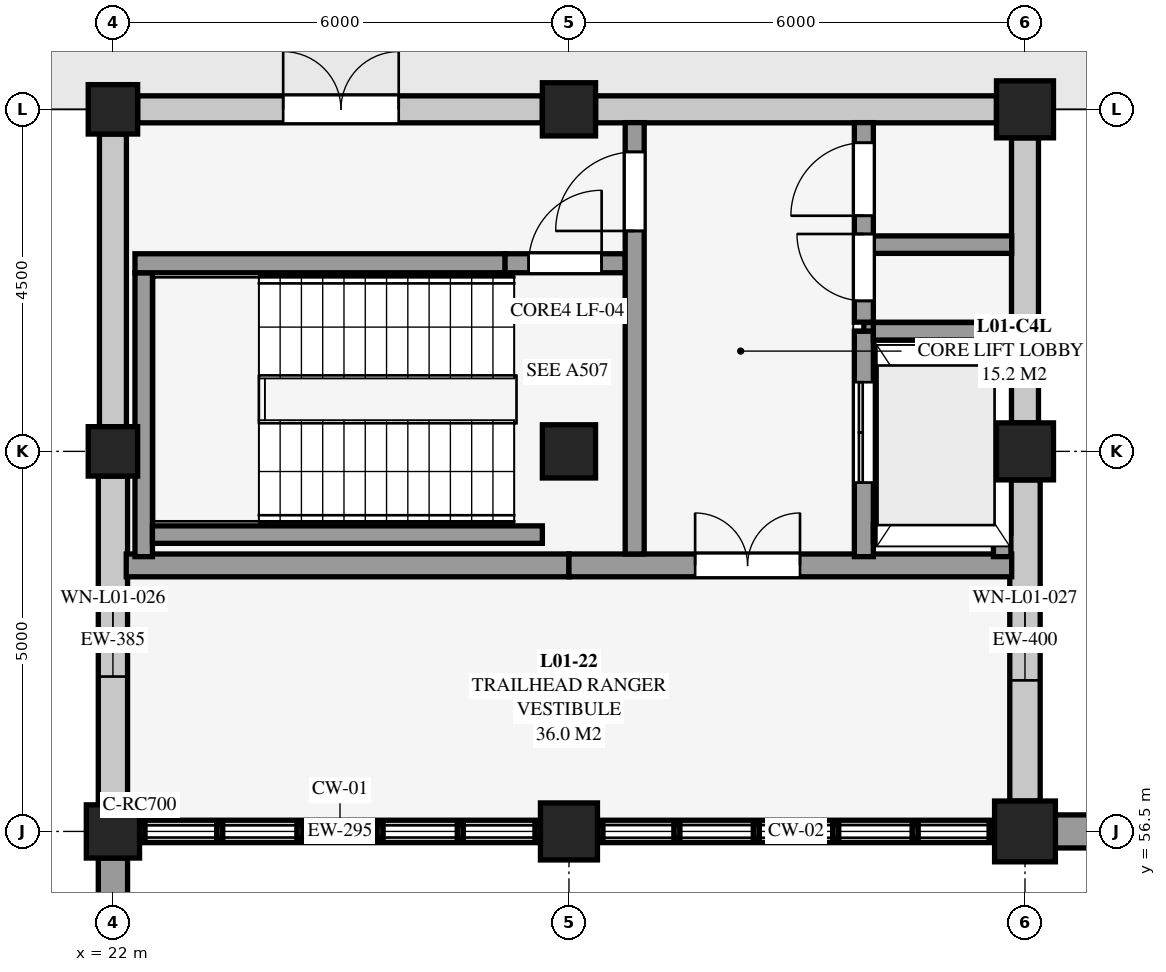
"""IFC4 building model, lengths in metres.
Left out: names, types, materials, properties, quantities, classifications, styles, units other than length and angle.
Written with IfcOpenShell. Run it as: python <this file> out.ifc"""

import sys

from ifc_helpers import new_model, si_unit, direction, frame, frame_2d, origin, origin_2d, place, context, subcontext, project, spatial, rectangle, extrude, element, fill, save


model = new_model("IFC4")
c1 = context("Model", 3, precision=1e-05, world=origin(), true_north=direction((0.0, 1.0)))
c2 = subcontext(c1, "Body", "Model", "MODEL_VIEW")
j1 = project(units=[si_unit("LENGTHUNIT", "METRE"), si_unit("PLANEANGLEUNIT", "RADIAN")], contexts=[c1])
p1 = place(None, origin())
s1 = spatial("IfcSite", under=j1, at=p1, CompositionType="ELEMENT")
p2 = place(p1, origin())
s2 = spatial("IfcBuilding", under=s1, at=p2, CompositionType="ELEMENT")
p3 = place(p2, origin())
s3 = spatial("IfcBuildingStorey", under=s2, at=p3, CompositionType="ELEMENT", Elevation=0.0)
p4 = place(p3, frame((22.0, 56.5, 0.0), z_axis=(0.0, 0.0, 1.0), x_axis=(1.0, 0.0, 0.0)))
e1 = element("IfcColumn", 1, at=p4, inside=s3, PredefinedType="COLUMN", context=c2, shape_type="SweptSolid", body=[
    extrude(rectangle(XDim=0.7, YDim=0.7, at=origin_2d()), origin(), (0.0, 0.0, 1.0), 4.5),
])
for number, where, z_axis, x_axis in (
    (2, (22.0, 61.5, 0.0), (0.0, 0.0, 1.0), (1.0, 0.0, 0.0)),
    (3, (22.0, 66.0, 0.0), (0.0, 0.0, 1.0), (1.0, 0.0, 0.0)),
):
    element("IfcColumn", number, at=place(p3, frame(where, z_axis=z_axis, x_axis=x_axis)), inside=s3, PredefinedType="COLUMN", context=c2, shape_type="SweptSolid", body=[
        extrude(rectangle(XDim=0.65, YDim=0.65, at=origin_2d()), origin(), (0.0, 0.0, 1.0), 4.5),
    ])
p5 = place(p3, frame((28.0, 56.5, 0.0), z_axis=(0.0, 0.0, 1.0), x_axis=(1.0, 0.0, 0.0)))
e4 = element("IfcColumn", 4, at=p5, inside=s3, PredefinedType="COLUMN", context=c2, shape_type="SweptSolid", body=[
    extrude(rectangle(XDim=0.75, YDim=0.75, at=origin_2d()), origin(), (0.0, 0.0, 1.0), 4.5),
])
for number, where, z_axis, x_axis in (
    (5, (28.0, 61.5, 0.0), (0.0, 0.0, 1.0), (1.0, 0.0, 0.0)),
    (6, (28.0, 66.0, 0.0), (0.0, 0.0, 1.0), (1.0, 0.0, 0.0)),
):
    element("IfcColumn", number, at=place(p3, frame(where, z_axis=z_axis, x_axis=x_axis)), inside=s3, PredefinedType="COLUMN", context=c2, shape_type="SweptSolid", body=[
        extrude(rectangle(XDim=0.7, YDim=0.7, at=origin_2d()), origin(), (0.0, 0.0, 1.0), 4.5),
    ])
p6 = place(p3, frame((34.0, 56.5, 0.0), z_axis=(0.0, 0.0, 1.0), x_axis=(1.0, 0.0, 0.0)))
e7 = element("IfcColumn", 7, at=p6, inside=s3, PredefinedType="COLUMN", context=c2, shape_type="SweptSolid", body=[
    extrude(rectangle(XDim=0.8, YDim=0.8, at=origin_2d()), origin(), (0.0, 0.0, 1.0), 4.5),
])
for number, where, z_axis, x_axis in (
    (8, (34.0, 61.5, 0.0), (0.0, 0.0, 1.0), (1.0, 0.0, 0.0)),
    (9, (34.0, 66.0, 0.0), (0.0, 0.0, 1.0), (1.0, 0.0, 0.0)),
):
    element("IfcColumn", number, at=place(p3, frame(where, z_axis=z_axis, x_axis=x_axis)), inside=s3, PredefinedType="COLUMN", context=c2, shape_type="SweptSolid", body=[
        extrude(rectangle(XDim=0.75, YDim=0.75, at=origin_2d()), origin(), (0.0, 0.0, 1.0), 4.5),
    ])
p7 = place(p3, frame((34.4, 56.5, 0.0), z_axis=(0.0, 0.0, 1.0), x_axis=(1.0, 0.0, 0.0)))
e10 = element("IfcWall", 10, at=p7, inside=s3, PredefinedType="USERDEFINED", context=c2, shape_type="SweptSolid", body=[
    extrude(rectangle(XDim=5.25, YDim=0.435, at=frame_2d((2.625, 0.0))), origin(), (0.0, 0.0, 1.0), 4.5),
])
p8 = place(p3, frame((22.0, 51.375, 0.0), z_axis=(0.0, 0.0, 1.0), x_axis=(0.0, 1.0, 0.0)))
e11 = element("IfcWall", 11, at=p8, inside=s3, PredefinedType="USERDEFINED", context=c2, shape_type="SweptSolid", body=[
    extrude(rectangle(XDim=4.775, YDim=0.385, at=frame_2d((2.387, 0.0))), origin(), (0.0, 0.0, 1.0), 4.5),
])
p9 = place(p3, frame((27.625, 56.5, 0.0), z_axis=(0.0, 0.0, 1.0), x_axis=(-1.0, 0.0, 0.0)))
e12 = element("IfcWall", 12, at=p9, inside=s3, PredefinedType="SOLIDWALL", context=c2, shape_type="SweptSolid", body=[
    extrude(rectangle(XDim=5.275, YDim=0.295, at=frame_2d((2.637, 0.0))), origin(), (0.0, 0.0, 1.0), 0.16),
])
p10 = place(p3, frame((22.325, 66.0, 0.0), z_axis=(0.0, 0.0, 1.0), x_axis=(1.0, 0.0, 0.0)))
e13 = element("IfcWall", 13, at=p10, inside=s3, PredefinedType="SOLIDWALL", context=c2, shape_type="SweptSolid", body=[
    extrude(rectangle(XDim=5.325, YDim=0.355, at=frame_2d((2.663, 0.0))), origin(), (0.0, 0.0, 1.0), 3.881),
])
p11 = place(p10, frame((1.915, 0.0, 0.0)))
e14 = element("IfcOpeningElement", 14, at=p11, cuts=e13, PredefinedType="OPENING", context=c2, shape_type="SweptSolid", body=[
    extrude(rectangle(XDim=1.52, YDim=2.16, at=frame_2d((0.76, 1.08))), frame((0.0, 0.188, 0.0), z_axis=(0.0, -1.0, 0.0), x_axis=(1.0, 0.0, 0.0)), (0.0, 0.0, 1.0), 0.375),
])
p12 = place(p3, frame((33.6, 56.5, 0.0), z_axis=(0.0, 0.0, 1.0), x_axis=(-1.0, 0.0, 0.0)))
e15 = element("IfcWall", 15, at=p12, inside=s3, PredefinedType="SOLIDWALL", context=c2, shape_type="SweptSolid", body=[
    extrude(rectangle(XDim=5.225, YDim=0.295, at=frame_2d((2.613, 0.0))), origin(), (0.0, 0.0, 1.0), 0.21),
])
p13 = place(p3, frame((28.35, 66.0, 0.0), z_axis=(0.0, 0.0, 1.0), x_axis=(1.0, 0.0, 0.0)))
e16 = element("IfcWall", 16, at=p13, inside=s3, PredefinedType="SOLIDWALL", context=c2, shape_type="SweptSolid", body=[
    extrude(rectangle(XDim=5.275, YDim=0.355, at=frame_2d((2.637, 0.0))), origin(), (0.0, 0.0, 1.0), 3.881),
])
p14 = place(p3, frame((22.0, 56.85, 0.0), z_axis=(0.0, 0.0, 1.0), x_axis=(0.0, 1.0, 0.0)))
e17 = element("IfcWall", 17, at=p14, inside=s3, PredefinedType="SOLIDWALL", context=c2, shape_type="SweptSolid", body=[
    extrude(rectangle(XDim=4.325, YDim=0.385, at=frame_2d((2.163, 0.0))), origin(), (0.0, 0.0, 1.0), 3.843),
])
p15 = place(p14, frame((1.688, 0.0, 0.9)))
e18 = element("IfcOpeningElement", 18, at=p15, cuts=e17, PredefinedType="OPENING", context=c2, shape_type="SweptSolid", body=[
    extrude(rectangle(XDim=0.95, YDim=1.95, at=frame_2d((0.475, 0.975))), frame((0.0, 0.202, 0.0), z_axis=(0.0, -1.0, 0.0), x_axis=(1.0, 0.0, 0.0)), (0.0, 0.0, 1.0), 0.405),
])
p16 = place(p3, frame((34.0, 61.125, 0.0), z_axis=(0.0, 0.0, 1.0), x_axis=(0.0, -1.0, 0.0)))
e19 = element("IfcWall", 19, at=p16, inside=s3, PredefinedType="SOLIDWALL", context=c2, shape_type="SweptSolid", body=[
    extrude(rectangle(XDim=4.225, YDim=0.4, at=frame_2d((2.113, 0.0))), origin(), (0.0, 0.0, 1.0), 3.881),
])
p17 = place(p16, frame((1.587, 0.0, 0.85)))
e20 = element("IfcOpeningElement", 20, at=p17, cuts=e19, PredefinedType="OPENING", context=c2, shape_type="SweptSolid", body=[
    extrude(rectangle(XDim=1.05, YDim=2.05, at=frame_2d((0.525, 1.025))), frame((0.0, 0.21, 0.0), z_axis=(0.0, -1.0, 0.0), x_axis=(1.0, 0.0, 0.0)), (0.0, 0.0, 1.0), 0.42),
])
p18 = place(p3, frame((22.0, 61.825, 0.0), z_axis=(0.0, 0.0, 1.0), x_axis=(0.0, 1.0, 0.0)))
e21 = element("IfcWall", 21, at=p18, inside=s3, PredefinedType="SOLIDWALL", context=c2, shape_type="SweptSolid", body=[
    extrude(rectangle(XDim=3.85, YDim=0.355, at=frame_2d((1.925, 0.0))), origin(), (0.0, 0.0, 1.0), 3.843),
])
p19 = place(p3, frame((34.0, 65.625, 0.0), z_axis=(0.0, 0.0, 1.0), x_axis=(0.0, -1.0, 0.0)))
e22 = element("IfcWall", 22, at=p19, inside=s3, PredefinedType="SOLIDWALL", context=c2, shape_type="SweptSolid", body=[
    extrude(rectangle(XDim=3.75, YDim=0.355, at=frame_2d((1.875, 0.0))), origin(), (0.0, 0.0, 1.0), 3.881),
])
p20 = place(p3, frame((31.88, 60.42, -1.05), z_axis=(0.0, 0.0, 1.0), x_axis=(1.0, 0.0, 0.0)))
e23 = element("IfcWall", 23, at=p20, inside=s3, PredefinedType="SHEAR", context=c2, shape_type="SweptSolid", body=[
    extrude(rectangle(XDim=1.82, YDim=0.23, at=frame_2d((0.91, 0.0))), origin(), (0.0, 0.0, 1.0), 1.05),
])
p21 = place(p3, frame((33.7, 60.42, -1.05), z_axis=(0.0, 0.0, 1.0), x_axis=(0.0, 1.0, 0.0)))
e24 = element("IfcWall", 24, at=p21, inside=s3, PredefinedType="SHEAR", context=c2, shape_type="SweptSolid", body=[
    extrude(rectangle(XDim=2.66, YDim=0.23, at=frame_2d((1.33, 0.0))), origin(), (0.0, 0.0, 1.0), 1.05),
])
p22 = place(p3, frame((33.7, 63.08, -1.05), z_axis=(0.0, 0.0, 1.0), x_axis=(-1.0, 0.0, 0.0)))
e25 = element("IfcWall", 25, at=p22, inside=s3, PredefinedType="SHEAR", context=c2, shape_type="SweptSolid", body=[
    extrude(rectangle(XDim=1.82, YDim=0.23, at=frame_2d((0.91, 0.0))), origin(), (0.0, 0.0, 1.0), 1.05),
])
p23 = place(p3, frame((31.88, 63.08, -1.05), z_axis=(0.0, 0.0, 1.0), x_axis=(0.0, -1.0, 0.0)))
e26 = element("IfcWall", 26, at=p23, inside=s3, PredefinedType="SHEAR", context=c2, shape_type="SweptSolid", body=[
    extrude(rectangle(XDim=2.66, YDim=0.23, at=frame_2d((1.33, 0.0))), origin(), (0.0, 0.0, 1.0), 1.05),
])
p24 = place(p3, frame((22.175, 60.0, 0.0), z_axis=(0.0, 0.0, 1.0), x_axis=(1.0, 0.0, 0.0)))
e27 = element("IfcWall", 27, at=p24, inside=s3, PredefinedType="SHEAR", context=c2, shape_type="SweptSolid", body=[
    extrude(rectangle(XDim=5.825, YDim=0.3, at=frame_2d((2.913, 0.0))), origin(), (0.0, 0.0, 1.0), 4.288),
])
p25 = place(p3, frame((28.0, 60.0, 0.0), z_axis=(0.0, 0.0, 1.0), x_axis=(1.0, 0.0, 0.0)))
e28 = element("IfcWall", 28, at=p25, inside=s3, PredefinedType="SHEAR", context=c2, shape_type="SweptSolid", body=[
    extrude(rectangle(XDim=5.825, YDim=0.3, at=frame_2d((2.913, 0.0))), origin(), (0.0, 0.0, 1.0), 4.288),
])
p26 = place(p25, frame((1.66, 0.0, 0.0)))
e29 = element("IfcOpeningElement", 29, at=p26, cuts=e28, PredefinedType="OPENING", context=c2, shape_type="SweptSolid", body=[
    extrude(rectangle(XDim=1.38, YDim=2.16, at=frame_2d((0.69, 1.08))), frame((0.0, 0.16, 0.0), z_axis=(0.0, -1.0, 0.0), x_axis=(1.0, 0.0, 0.0)), (0.0, 0.0, 1.0), 0.32),
])
p27 = place(p3, frame((22.405, 60.115, 0.0), z_axis=(0.0, 0.0, 1.0), x_axis=(0.0, 1.0, 0.0)))
e30 = element("IfcWall", 30, at=p27, inside=s3, PredefinedType="SHEAR", context=c2, shape_type="SweptSolid", body=[
    extrude(rectangle(XDim=3.735, YDim=0.23, at=frame_2d((1.868, 0.0))), origin(), (0.0, 0.0, 1.0), 4.5),
])
p28 = place(p3, frame((22.52, 60.405, 0.0), z_axis=(0.0, 0.0, 1.0), x_axis=(1.0, 0.0, 0.0)))
e31 = element("IfcWall", 31, at=p28, inside=s3, PredefinedType="SHEAR", context=c2, shape_type="SweptSolid", body=[
    extrude(rectangle(XDim=5.13, YDim=0.23, at=frame_2d((2.565, 0.0))), origin(), (0.0, 0.0, 1.0), 4.5),
])
p29 = place(p3, frame((22.29, 63.975, 0.0), z_axis=(0.0, 0.0, 1.0), x_axis=(1.0, 0.0, 0.0)))
e32 = element("IfcWall", 32, at=p29, inside=s3, PredefinedType="SHEAR", context=c2, shape_type="SweptSolid", body=[
    extrude(rectangle(XDim=4.87, YDim=0.25, at=frame_2d((2.435, 0.0))), origin(), (0.0, 0.0, 1.0), 4.5),
])
p30 = place(p3, frame((27.16, 63.975, 0.0), z_axis=(0.0, 0.0, 1.0), x_axis=(1.0, 0.0, 0.0)))
e33 = element("IfcWall", 33, at=p30, inside=s3, PredefinedType="SHEAR", context=c2, shape_type="SweptSolid", body=[
    extrude(rectangle(XDim=1.58, YDim=0.25, at=frame_2d((0.79, 0.0))), origin(), (0.0, 0.0, 1.0), 4.288),
])
p31 = place(p30, frame((0.31, 0.0, 0.0)))
e34 = element("IfcOpeningElement", 34, at=p31, cuts=e33, PredefinedType="OPENING", context=c2, shape_type="SweptSolid", body=[
    extrude(rectangle(XDim=0.96, YDim=2.12, at=frame_2d((0.48, 1.06))), frame((0.0, 0.135, 0.0), z_axis=(0.0, -1.0, 0.0), x_axis=(1.0, 0.0, 0.0)), (0.0, 0.0, 1.0), 0.27),
])
p32 = place(p3, frame((28.865, 60.15, 0.0), z_axis=(0.0, 0.0, 1.0), x_axis=(0.0, 1.0, 0.0)))
e35 = element("IfcWall", 35, at=p32, inside=s3, PredefinedType="SHEAR", context=c2, shape_type="SweptSolid", body=[
    extrude(rectangle(XDim=5.675, YDim=0.25, at=frame_2d((2.837, 0.0))), origin(), (0.0, 0.0, 1.0), 4.288),
])
p33 = place(p32, frame((4.25, 0.0, 0.0)))
e36 = element("IfcOpeningElement", 36, at=p33, cuts=e35, PredefinedType="OPENING", context=c2, shape_type="SweptSolid", body=[
    extrude(rectangle(XDim=1.04, YDim=2.14, at=frame_2d((0.52, 1.07))), frame((0.0, 0.135, 0.0), z_axis=(0.0, -1.0, 0.0), x_axis=(1.0, 0.0, 0.0)), (0.0, 0.0, 1.0), 0.27),
])
p34 = place(p3, frame((31.88, 60.115, 0.0), z_axis=(0.0, 0.0, 1.0), x_axis=(0.0, 1.0, 0.0)))
e37 = element("IfcWall", 37, at=p34, inside=s3, PredefinedType="SHEAR", context=c2, shape_type="SweptSolid", body=[
    extrude(rectangle(XDim=2.965, YDim=0.25, at=frame_2d((1.482, 0.0))), origin(), (0.0, 0.0, 1.0), 4.5),
])
p35 = place(p34, frame((0.975, 0.0, 0.0)))
e38 = element("IfcOpeningElement", 38, at=p35, cuts=e37, PredefinedType="OPENING", context=c2, shape_type="SweptSolid", body=[
    extrude(rectangle(XDim=1.32, YDim=2.2, at=frame_2d((0.66, 1.1))), frame((0.0, 0.135, 0.0), z_axis=(0.0, -1.0, 0.0), x_axis=(1.0, 0.0, 0.0)), (0.0, 0.0, 1.0), 0.27),
])
p36 = place(p3, frame((32.005, 60.42, 0.0), z_axis=(0.0, 0.0, 1.0), x_axis=(1.0, 0.0, 0.0)))
e39 = element("IfcWall", 39, at=p36, inside=s3, PredefinedType="SHEAR", context=c2, shape_type="SweptSolid", body=[
    extrude(rectangle(XDim=1.58, YDim=0.23, at=frame_2d((0.79, 0.0))), origin(), (0.0, 0.0, 1.0), 4.5),
])
p37 = place(p3, frame((33.7, 60.115, 0.0), z_axis=(0.0, 0.0, 1.0), x_axis=(0.0, 1.0, 0.0)))
e40 = element("IfcWall", 40, at=p37, inside=s3, PredefinedType="SHEAR", context=c2, shape_type="SweptSolid", body=[
    extrude(rectangle(XDim=2.965, YDim=0.23, at=frame_2d((1.482, 0.0))), origin(), (0.0, 0.0, 1.0), 4.5),
])
p38 = place(p3, frame((32.005, 63.08, 0.0), z_axis=(0.0, 0.0, 1.0), x_axis=(1.0, 0.0, 0.0)))
e41 = element("IfcWall", 41, at=p38, inside=s3, PredefinedType="SHEAR", context=c2, shape_type="SweptSolid", body=[
    extrude(rectangle(XDim=1.58, YDim=0.23, at=frame_2d((0.79, 0.0))), origin(), (0.0, 0.0, 1.0), 4.5),
])
p39 = place(p3, frame((31.88, 63.2, 0.0), z_axis=(0.0, 0.0, 1.0), x_axis=(0.0, 1.0, 0.0)))
e42 = element("IfcWall", 42, at=p39, inside=s3, PredefinedType="SHEAR", context=c2, shape_type="SweptSolid", body=[
    extrude(rectangle(XDim=2.625, YDim=0.25, at=frame_2d((1.312, 0.0))), origin(), (0.0, 0.0, 1.0), 4.288),
])
p40 = place(p39, frame((0.28, 0.0, 0.0)))
e43 = element("IfcOpeningElement", 43, at=p40, cuts=e42, PredefinedType="OPENING", context=c2, shape_type="SweptSolid", body=[
    extrude(rectangle(XDim=0.88, YDim=2.08, at=frame_2d((0.44, 1.04))), frame((0.0, 0.135, 0.0), z_axis=(0.0, -1.0, 0.0), x_axis=(1.0, 0.0, 0.0)), (0.0, 0.0, 1.0), 0.27),
])
p41 = place(p39, frame((1.4, 0.0, 0.0)))
e44 = element("IfcOpeningElement", 44, at=p41, cuts=e42, PredefinedType="OPENING", context=c2, shape_type="SweptSolid", body=[
    extrude(rectangle(XDim=0.96, YDim=2.12, at=frame_2d((0.48, 1.06))), frame((0.0, 0.135, 0.0), z_axis=(0.0, -1.0, 0.0), x_axis=(1.0, 0.0, 0.0)), (0.0, 0.0, 1.0), 0.27),
])
p42 = place(p3, frame((32.005, 64.22, 0.0), z_axis=(0.0, 0.0, 1.0), x_axis=(1.0, 0.0, 0.0)))
e45 = element("IfcWall", 45, at=p42, inside=s3, PredefinedType="SHEAR", context=c2, shape_type="SweptSolid", body=[
    extrude(rectangle(XDim=1.82, YDim=0.23, at=frame_2d((0.91, 0.0))), origin(), (0.0, 0.0, 1.0), 4.288),
])
p43 = place(p11, origin())
e46 = element("IfcDoor", 46, at=p43, inside=s3, OperationType="DOUBLE_DOOR_SINGLE_SWING", PredefinedType="DOOR", context=c2, shape_type="SweptSolid", body=[
    extrude(rectangle(XDim=1.52, YDim=2.16, at=frame_2d((0.76, 1.08))), frame((0.0, 0.025, 0.0), z_axis=(0.0, -1.0, 0.0), x_axis=(1.0, 0.0, 0.0)), (0.0, 0.0, 1.0), 0.05),
])
fill(e14, e46)
p44 = place(p15, origin())
e47 = element("IfcWindow", 47, at=p44, inside=s3, PartitioningType="SINGLE_PANEL", PredefinedType="WINDOW", context=c2, shape_type="SweptSolid", body=[
    extrude(rectangle(XDim=0.95, YDim=1.95, at=frame_2d((0.475, 0.975))), frame((0.0, 0.03, 0.0), z_axis=(0.0, -1.0, 0.0), x_axis=(1.0, 0.0, 0.0)), (0.0, 0.0, 1.0), 0.06),
])
fill(e18, e47)
p45 = place(p17, origin())
e48 = element("IfcWindow", 48, at=p45, inside=s3, PartitioningType="SINGLE_PANEL", PredefinedType="WINDOW", context=c2, shape_type="SweptSolid", body=[
    extrude(rectangle(XDim=1.05, YDim=2.05, at=frame_2d((0.525, 1.025))), frame((0.0, 0.03, 0.0), z_axis=(0.0, -1.0, 0.0), x_axis=(1.0, 0.0, 0.0)), (0.0, 0.0, 1.0), 0.06),
])
fill(e20, e48)
p46 = place(p26, origin())
e49 = element("IfcDoor", 49, at=p46, inside=s3, OperationType="DOUBLE_DOOR_SINGLE_SWING", PredefinedType="DOOR", context=c2, shape_type="SweptSolid", body=[
    extrude(rectangle(XDim=1.38, YDim=2.16, at=frame_2d((0.69, 1.08))), frame((0.0, 0.025, 0.0), z_axis=(0.0, -1.0, 0.0), x_axis=(1.0, 0.0, 0.0)), (0.0, 0.0, 1.0), 0.05),
])
fill(e29, e49)
p47 = place(p31, origin())
e50 = element("IfcDoor", 50, at=p47, inside=s3, OperationType="SINGLE_SWING_RIGHT", PredefinedType="DOOR", context=c2, shape_type="SweptSolid", body=[
    extrude(rectangle(XDim=0.96, YDim=2.12, at=frame_2d((0.48, 1.06))), frame((0.0, 0.025, 0.0), z_axis=(0.0, -1.0, 0.0), x_axis=(1.0, 0.0, 0.0)), (0.0, 0.0, 1.0), 0.05),
])
fill(e34, e50)
p48 = place(p33, origin())
e51 = element("IfcDoor", 51, at=p48, inside=s3, OperationType="SINGLE_SWING_LEFT", PredefinedType="DOOR", context=c2, shape_type="SweptSolid", body=[
    extrude(rectangle(XDim=1.04, YDim=2.14, at=frame_2d((0.52, 1.07))), frame((0.0, 0.025, 0.0), z_axis=(0.0, -1.0, 0.0), x_axis=(1.0, 0.0, 0.0)), (0.0, 0.0, 1.0), 0.05),
])
fill(e36, e51)
p49 = place(p35, origin())
e52 = element("IfcDoor", 52, at=p49, inside=s3, OperationType="DOUBLE_DOOR_SLIDING", PredefinedType="DOOR", context=c2, shape_type="SweptSolid", body=[
    extrude(rectangle(XDim=1.32, YDim=2.2, at=frame_2d((0.66, 1.1))), frame((0.0, 0.025, 0.0), z_axis=(0.0, -1.0, 0.0), x_axis=(1.0, 0.0, 0.0)), (0.0, 0.0, 1.0), 0.05),
])
fill(e38, e52)
p50 = place(p40, origin())
e53 = element("IfcDoor", 53, at=p50, inside=s3, OperationType="SINGLE_SWING_RIGHT", PredefinedType="DOOR", context=c2, shape_type="SweptSolid", body=[
    extrude(rectangle(XDim=0.88, YDim=2.08, at=frame_2d((0.44, 1.04))), frame((0.0, 0.025, 0.0), z_axis=(0.0, -1.0, 0.0), x_axis=(1.0, 0.0, 0.0)), (0.0, 0.0, 1.0), 0.05),
])
fill(e43, e53)
p51 = place(p41, origin())
e54 = element("IfcDoor", 54, at=p51, inside=s3, OperationType="SINGLE_SWING_LEFT", PredefinedType="DOOR", context=c2, shape_type="SweptSolid", body=[
    extrude(rectangle(XDim=0.96, YDim=2.12, at=frame_2d((0.48, 1.06))), frame((0.0, 0.025, 0.0), z_axis=(0.0, -1.0, 0.0), x_axis=(1.0, 0.0, 0.0)), (0.0, 0.0, 1.0), 0.05),
])
fill(e44, e54)
save(model, sys.argv[1])
